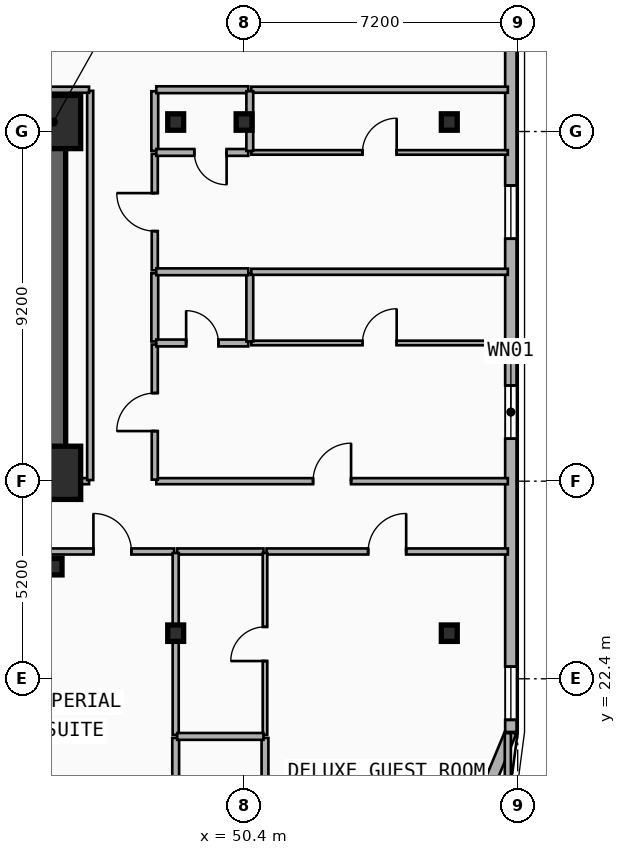
"""IFC4 building model, lengths in metres.
Left out: names, types, materials, properties, quantities, classifications, styles, units other than length and angle.
Written with IfcOpenShell. Run it as: python <this file> out.ifc"""

import sys

from ifc_helpers import new_model, si_unit, direction, frame, frame_2d, origin, origin_2d, place, context, subcontext, project, spatial, rectangle, i_section, extrude, element, fill, save


model = new_model("IFC4")
c1 = context("Model", 3, precision=1e-05, world=origin(), true_north=direction((0.0, 1.0)))
c2 = subcontext(c1, "Body", "Model", "MODEL_VIEW")
j1 = project(units=[si_unit("LENGTHUNIT", "METRE"), si_unit("PLANEANGLEUNIT", "RADIAN")], contexts=[c1])
p1 = place(None, origin())
s1 = spatial("IfcSite", under=j1, at=p1, CompositionType="ELEMENT")
p2 = place(p1, origin())
s2 = spatial("IfcBuilding", under=s1, at=p2, CompositionType="ELEMENT")
p3 = place(p2, frame((0.0, 0.0, 86.3)))
s3 = spatial("IfcBuildingStorey", under=s2, at=p3, CompositionType="ELEMENT", Elevation=86.3)
p4 = place(p3, frame((12.15, 37.05, 0.0), z_axis=(0.0, 0.0, 1.0), x_axis=(1.0, 0.0, 0.0)))
e1 = element("IfcWall", 1, at=p4, inside=s3, PredefinedType="SHEAR", context=c2, shape_type="SweptSolid", body=[
    extrude(rectangle(XDim=33.23, YDim=0.65, at=frame_2d((16.615, 0.0))), origin(), (0.0, 0.0, 1.0), 3.5),
])
p5 = place(p3, frame((45.38, 27.82, 0.0), z_axis=(0.0, 0.0, 1.0), x_axis=(-1.0, 0.0, 0.0)))
e2 = element("IfcWall", 2, at=p5, inside=s3, PredefinedType="SHEAR", context=c2, shape_type="SweptSolid", body=[
    extrude(rectangle(XDim=12.23, YDim=0.65, at=frame_2d((6.115, 0.0))), origin(), (0.0, 0.0, 1.0), 3.5),
])
p6 = place(p5, frame((9.93, 0.0, 0.0)))
e3 = element("IfcOpeningElement", 3, at=p6, cuts=e2, PredefinedType="OPENING", context=c2, shape_type="SweptSolid", body=[
    extrude(rectangle(XDim=1.1, YDim=2.15, at=frame_2d((0.55, 1.075))), frame((0.0, 0.335, 0.0), z_axis=(0.0, -1.0, 0.0), x_axis=(1.0, 0.0, 0.0)), (0.0, 0.0, 1.0), 0.67),
])
p7 = place(p5, frame((6.23, 0.0, 0.0)))
e4 = element("IfcOpeningElement", 4, at=p7, cuts=e2, PredefinedType="OPENING", context=c2, shape_type="SweptSolid", body=[
    extrude(rectangle(XDim=1.1, YDim=2.15, at=frame_2d((0.55, 1.075))), frame((0.0, 0.335, 0.0), z_axis=(0.0, -1.0, 0.0), x_axis=(1.0, 0.0, 0.0)), (0.0, 0.0, 1.0), 0.67),
])
p8 = place(p3, frame((45.38, 28.145, 0.0), z_axis=(0.0, 0.0, 1.0), x_axis=(0.0, 1.0, 0.0)))
e5 = element("IfcWall", 5, at=p8, inside=s3, PredefinedType="SHEAR", context=c2, shape_type="SweptSolid", body=[
    extrude(rectangle(XDim=8.58, YDim=0.65, at=frame_2d((4.29, 0.0))), origin(), (0.0, 0.0, 1.0), 3.5),
])
for number, where, z_axis, x_axis in (
    (6, (45.4, 27.82, 0.0), (0.0, 0.0, 1.0), (1.0, 0.0, 0.0)),
    (7, (45.4, 37.05, 0.0), (0.0, 0.0, 1.0), (1.0, 0.0, 0.0)),
):
    element("IfcColumn", number, at=place(p3, frame(where, z_axis=z_axis, x_axis=x_axis)), inside=s3, PredefinedType="COLUMN", context=c2, shape_type="SweptSolid", body=[
        extrude(rectangle(XDim=1.4, YDim=1.4, at=origin_2d()), origin(), (0.0, 0.0, 1.0), 3.5),
    ])
for number, where, z_axis, x_axis in (
    (8, (45.4, 25.35, 0.0), (0.0, 0.0, 1.0), (1.0, 0.0, 0.0)),
    (9, (48.6, 23.6, 0.0), (0.0, 0.0, 1.0), (1.0, 0.0, 0.0)),
    (10, (48.6, 37.05, 0.0), (0.0, 0.0, 1.0), (1.0, 0.0, 0.0)),
    (11, (50.4, 37.05, 0.0), (0.0, 0.0, 1.0), (1.0, 0.0, 0.0)),
    (12, (55.8, 23.6, 0.0), (0.0, 0.0, 1.0), (1.0, 0.0, 0.0)),
    (13, (55.8, 37.05, 0.0), (0.0, 0.0, 1.0), (1.0, 0.0, 0.0)),
):
    element("IfcColumn", number, at=place(p3, frame(where, z_axis=z_axis, x_axis=x_axis)), inside=s3, PredefinedType="COLUMN", context=c2, shape_type="SweptSolid", body=[
        extrude(i_section(OverallWidth=0.418, OverallDepth=0.432, WebThickness=0.035, FlangeThickness=0.056, FilletRadius=0.015, at=origin_2d()), origin(), (0.0, 0.0, 1.0), 3.5),
    ])
p9 = place(p3, frame((57.42, 21.0, 0.0), z_axis=(0.0, 0.0, 1.0), x_axis=(-0.382636798336, -0.92389884758, 0.0)))
e14 = element("IfcWall", 14, at=p9, inside=s3, PredefinedType="SOLIDWALL", context=c2, shape_type="SweptSolid", body=[
    extrude(rectangle(XDim=3.077, YDim=0.3, at=frame_2d((1.538, 0.0))), origin(), (0.0, 0.0, 1.0), 3.24),
])
p10 = place(p3, frame((57.42, 39.0, 0.0), z_axis=(0.0, 0.0, 1.0), x_axis=(0.0, -1.0, 0.0)))
e15 = element("IfcWall", 15, at=p10, inside=s3, PredefinedType="SOLIDWALL", context=c2, shape_type="SweptSolid", body=[
    extrude(rectangle(XDim=18.0, YDim=0.3, at=frame_2d((9.0, 0.0))), origin(), (0.0, 0.0, 1.0), 3.24),
])
p11 = place(p10, frame((8.882, 0.0, 0.48)))
e16 = element("IfcOpeningElement", 16, at=p11, cuts=e15, PredefinedType="OPENING", context=c2, shape_type="SweptSolid", body=[
    extrude(rectangle(XDim=1.4, YDim=1.8, at=frame_2d((0.7, 0.9))), frame((0.0, 0.16, 0.0), z_axis=(0.0, -1.0, 0.0), x_axis=(1.0, 0.0, 0.0)), (0.0, 0.0, 1.0), 0.32),
])
p12 = place(p10, frame((3.621, 0.0, 0.48)))
e17 = element("IfcOpeningElement", 17, at=p12, cuts=e15, PredefinedType="OPENING", context=c2, shape_type="SweptSolid", body=[
    extrude(rectangle(XDim=1.4, YDim=1.8, at=frame_2d((0.7, 0.9))), frame((0.0, 0.16, 0.0), z_axis=(0.0, -1.0, 0.0), x_axis=(1.0, 0.0, 0.0)), (0.0, 0.0, 1.0), 0.32),
])
p13 = place(p10, frame((16.28, 0.0, 0.65)))
e18 = element("IfcOpeningElement", 18, at=p13, cuts=e15, PredefinedType="OPENING", context=c2, shape_type="SweptSolid", body=[
    extrude(rectangle(XDim=1.4, YDim=1.8, at=frame_2d((0.7, 0.9))), frame((0.0, 0.16, 0.0), z_axis=(0.0, -1.0, 0.0), x_axis=(1.0, 0.0, 0.0)), (0.0, 0.0, 1.0), 0.32),
])
p14 = place(p3, frame((48.09, 27.6, 0.0), z_axis=(0.0, 0.0, 1.0), x_axis=(1.0, 0.0, 0.0)))
e19 = element("IfcWall", 19, at=p14, inside=s3, PredefinedType="PARTITIONING", context=c2, shape_type="SweptSolid", body=[
    extrude(rectangle(XDim=9.25, YDim=0.16, at=frame_2d((4.625, 0.0))), origin(), (0.0, 0.0, 1.0), 2.57),
])
p15 = place(p14, frame((4.125, 0.0, 0.0)))
e20 = element("IfcOpeningElement", 20, at=p15, cuts=e19, PredefinedType="OPENING", context=c2, shape_type="SweptSolid", body=[
    extrude(rectangle(XDim=1.0, YDim=2.15, at=frame_2d((0.5, 1.075))), frame((0.0, 0.09, 0.0), z_axis=(0.0, -1.0, 0.0), x_axis=(1.0, 0.0, 0.0)), (0.0, 0.0, 1.0), 0.18),
])
p16 = place(p3, frame((43.341, 25.75, 0.0), z_axis=(0.0, 0.0, 1.0), x_axis=(1.0, 0.0, 0.0)))
e21 = element("IfcWall", 21, at=p16, inside=s3, PredefinedType="PARTITIONING", context=c2, shape_type="SweptSolid", body=[
    extrude(rectangle(XDim=5.219, YDim=0.16, at=frame_2d((2.609, 0.0))), origin(), (0.0, 0.0, 1.0), 2.31),
])
p17 = place(p16, frame((3.094, 0.0, 0.0)))
e22 = element("IfcOpeningElement", 22, at=p17, cuts=e21, PredefinedType="OPENING", context=c2, shape_type="SweptSolid", body=[
    extrude(rectangle(XDim=1.0, YDim=2.15, at=frame_2d((0.5, 1.075))), frame((0.0, 0.09, 0.0), z_axis=(0.0, -1.0, 0.0), x_axis=(1.0, 0.0, 0.0)), (0.0, 0.0, 1.0), 0.18),
])
p18 = place(p3, frame((50.99, 25.75, 0.0), z_axis=(0.0, 0.0, 1.0), x_axis=(1.0, 0.0, 0.0)))
e23 = element("IfcWall", 23, at=p18, inside=s3, PredefinedType="PARTITIONING", context=c2, shape_type="SweptSolid", body=[
    extrude(rectangle(XDim=6.35, YDim=0.16, at=frame_2d((3.175, 0.0))), origin(), (0.0, 0.0, 1.0), 2.57),
])
p19 = place(p18, frame((2.675, 0.0, 0.0)))
e24 = element("IfcOpeningElement", 24, at=p19, cuts=e23, PredefinedType="OPENING", context=c2, shape_type="SweptSolid", body=[
    extrude(rectangle(XDim=1.0, YDim=2.15, at=frame_2d((0.5, 1.075))), frame((0.0, 0.09, 0.0), z_axis=(0.0, -1.0, 0.0), x_axis=(1.0, 0.0, 0.0)), (0.0, 0.0, 1.0), 0.18),
])
p20 = place(p3, frame((48.64, 25.75, 0.0), z_axis=(0.0, 0.0, 1.0), x_axis=(1.0, 0.0, 0.0)))
e25 = element("IfcWall", 25, at=p20, inside=s3, PredefinedType="PARTITIONING", context=c2, shape_type="SweptSolid", body=[
    extrude(rectangle(XDim=2.27, YDim=0.16, at=frame_2d((1.135, 0.0))), origin(), (0.0, 0.0, 1.0), 2.57),
])
p21 = place(p3, frame((48.05, 27.64, 0.0), z_axis=(0.0, 0.0, 1.0), x_axis=(0.0, 1.0, 0.0)))
e26 = element("IfcWall", 26, at=p21, inside=s3, PredefinedType="PARTITIONING", context=c2, shape_type="SweptSolid", body=[
    extrude(rectangle(XDim=3.556, YDim=0.16, at=frame_2d((1.778, 0.0))), origin(), (0.0, 0.0, 1.0), 3.24),
])
p22 = place(p21, frame((1.278, 0.0, 0.0)))
e27 = element("IfcOpeningElement", 27, at=p22, cuts=e26, PredefinedType="OPENING", context=c2, shape_type="SweptSolid", body=[
    extrude(rectangle(XDim=1.0, YDim=2.15, at=frame_2d((0.5, 1.075))), frame((0.0, 0.09, 0.0), z_axis=(0.0, -1.0, 0.0), x_axis=(1.0, 0.0, 0.0)), (0.0, 0.0, 1.0), 0.18),
])
p23 = place(p3, frame((48.05, 31.276, 0.0), z_axis=(0.0, 0.0, 1.0), x_axis=(0.0, 1.0, 0.0)))
e28 = element("IfcWall", 28, at=p23, inside=s3, PredefinedType="PLUMBINGWALL", context=c2, shape_type="SweptSolid", body=[
    extrude(rectangle(XDim=1.793, YDim=0.18, at=frame_2d((0.896, 0.0))), origin(), (0.0, 0.0, 1.0), 3.24),
])
p24 = place(p3, frame((48.05, 33.149, 0.0), z_axis=(0.0, 0.0, 1.0), x_axis=(0.0, 1.0, 0.0)))
e29 = element("IfcWall", 29, at=p24, inside=s3, PredefinedType="PARTITIONING", context=c2, shape_type="SweptSolid", body=[
    extrude(rectangle(XDim=3.061, YDim=0.16, at=frame_2d((1.531, 0.0))), origin(), (0.0, 0.0, 1.0), 3.24),
])
p25 = place(p24, frame((1.031, 0.0, 0.0)))
e30 = element("IfcOpeningElement", 30, at=p25, cuts=e29, PredefinedType="OPENING", context=c2, shape_type="SweptSolid", body=[
    extrude(rectangle(XDim=1.0, YDim=2.15, at=frame_2d((0.5, 1.075))), frame((0.0, 0.09, 0.0), z_axis=(0.0, -1.0, 0.0), x_axis=(1.0, 0.0, 0.0)), (0.0, 0.0, 1.0), 0.18),
])
p26 = place(p3, frame((48.05, 36.29, 0.0), z_axis=(0.0, 0.0, 1.0), x_axis=(0.0, 1.0, 0.0)))
e31 = element("IfcWall", 31, at=p26, inside=s3, PredefinedType="PLUMBINGWALL", context=c2, shape_type="SweptSolid", body=[
    extrude(rectangle(XDim=1.57, YDim=0.18, at=frame_2d((0.785, 0.0))), origin(), (0.0, 0.0, 1.0), 2.72),
])
p27 = place(p3, frame((48.09, 37.9, 0.0), z_axis=(0.0, 0.0, 1.0), x_axis=(1.0, 0.0, 0.0)))
e32 = element("IfcWall", 32, at=p27, inside=s3, PredefinedType="PLUMBINGWALL", context=c2, shape_type="SweptSolid", body=[
    extrude(rectangle(XDim=2.42, YDim=0.18, at=frame_2d((1.21, 0.0))), origin(), (0.0, 0.0, 1.0), 3.24),
])
p28 = place(p3, frame((50.59, 37.9, 0.0), z_axis=(0.0, 0.0, 1.0), x_axis=(1.0, 0.0, 0.0)))
e33 = element("IfcWall", 33, at=p28, inside=s3, PredefinedType="PARTITIONING", context=c2, shape_type="SweptSolid", body=[
    extrude(rectangle(XDim=6.75, YDim=0.16, at=frame_2d((3.375, 0.0))), origin(), (0.0, 0.0, 1.0), 3.24),
])
p29 = place(p3, frame((48.09, 31.236, 0.0), z_axis=(0.0, 0.0, 1.0), x_axis=(1.0, 0.0, 0.0)))
e34 = element("IfcWall", 34, at=p29, inside=s3, PredefinedType="PLUMBINGWALL", context=c2, shape_type="SweptSolid", body=[
    extrude(rectangle(XDim=2.42, YDim=0.18, at=frame_2d((1.21, 0.0))), origin(), (0.0, 0.0, 1.0), 2.57),
])
p30 = place(p29, frame((0.785, 0.0, 0.0)))
e35 = element("IfcOpeningElement", 35, at=p30, cuts=e34, PredefinedType="OPENING", context=c2, shape_type="SweptSolid", body=[
    extrude(rectangle(XDim=0.85, YDim=2.1, at=frame_2d((0.425, 1.05))), frame((0.0, 0.1, 0.0), z_axis=(0.0, -1.0, 0.0), x_axis=(1.0, 0.0, 0.0)), (0.0, 0.0, 1.0), 0.2),
])
p31 = place(p3, frame((50.59, 31.236, 0.0), z_axis=(0.0, 0.0, 1.0), x_axis=(1.0, 0.0, 0.0)))
e36 = element("IfcWall", 36, at=p31, inside=s3, PredefinedType="PARTITIONING", context=c2, shape_type="SweptSolid", body=[
    extrude(rectangle(XDim=6.75, YDim=0.12, at=frame_2d((3.375, 0.0))), origin(), (0.0, 0.0, 1.0), 2.57),
])
p32 = place(p31, frame((2.925, 0.0, 0.0)))
e37 = element("IfcOpeningElement", 37, at=p32, cuts=e36, PredefinedType="OPENING", context=c2, shape_type="SweptSolid", body=[
    extrude(rectangle(XDim=0.9, YDim=2.1, at=frame_2d((0.45, 1.05))), frame((0.0, 0.07, 0.0), z_axis=(0.0, -1.0, 0.0), x_axis=(1.0, 0.0, 0.0)), (0.0, 0.0, 1.0), 0.14),
])
p33 = place(p3, frame((50.55, 31.276, 0.0), z_axis=(0.0, 0.0, 1.0), x_axis=(0.0, 1.0, 0.0)))
e38 = element("IfcWall", 38, at=p33, inside=s3, PredefinedType="PLUMBINGWALL", context=c2, shape_type="SweptSolid", body=[
    extrude(rectangle(XDim=1.793, YDim=0.18, at=frame_2d((0.896, 0.0))), origin(), (0.0, 0.0, 1.0), 2.57),
])
p34 = place(p3, frame((48.09, 33.109, 0.0), z_axis=(0.0, 0.0, 1.0), x_axis=(1.0, 0.0, 0.0)))
e39 = element("IfcWall", 39, at=p34, inside=s3, PredefinedType="PLUMBINGWALL", context=c2, shape_type="SweptSolid", body=[
    extrude(rectangle(XDim=2.42, YDim=0.18, at=frame_2d((1.21, 0.0))), origin(), (0.0, 0.0, 1.0), 2.57),
])
p35 = place(p3, frame((50.59, 33.109, 0.0), z_axis=(0.0, 0.0, 1.0), x_axis=(1.0, 0.0, 0.0)))
e40 = element("IfcWall", 40, at=p35, inside=s3, PredefinedType="PARTITIONING", context=c2, shape_type="SweptSolid", body=[
    extrude(rectangle(XDim=6.75, YDim=0.16, at=frame_2d((3.375, 0.0))), origin(), (0.0, 0.0, 1.0), 2.57),
])
p36 = place(p3, frame((50.51, 36.25, 0.0), z_axis=(0.0, 0.0, 1.0), x_axis=(-1.0, 0.0, 0.0)))
e41 = element("IfcWall", 41, at=p36, inside=s3, PredefinedType="PLUMBINGWALL", context=c2, shape_type="SweptSolid", body=[
    extrude(rectangle(XDim=2.42, YDim=0.18, at=frame_2d((1.21, 0.0))), origin(), (0.0, 0.0, 1.0), 2.57),
])
p37 = place(p36, frame((0.57, 0.0, 0.0)))
e42 = element("IfcOpeningElement", 42, at=p37, cuts=e41, PredefinedType="OPENING", context=c2, shape_type="SweptSolid", body=[
    extrude(rectangle(XDim=0.85, YDim=2.1, at=frame_2d((0.425, 1.05))), frame((0.0, 0.1, 0.0), z_axis=(0.0, -1.0, 0.0), x_axis=(1.0, 0.0, 0.0)), (0.0, 0.0, 1.0), 0.2),
])
p38 = place(p3, frame((50.59, 36.25, 0.0), z_axis=(0.0, 0.0, 1.0), x_axis=(1.0, 0.0, 0.0)))
e43 = element("IfcWall", 43, at=p38, inside=s3, PredefinedType="PARTITIONING", context=c2, shape_type="SweptSolid", body=[
    extrude(rectangle(XDim=6.75, YDim=0.12, at=frame_2d((3.375, 0.0))), origin(), (0.0, 0.0, 1.0), 2.57),
])
p39 = place(p38, frame((2.925, 0.0, 0.0)))
e44 = element("IfcOpeningElement", 44, at=p39, cuts=e43, PredefinedType="OPENING", context=c2, shape_type="SweptSolid", body=[
    extrude(rectangle(XDim=0.9, YDim=2.1, at=frame_2d((0.45, 1.05))), frame((0.0, 0.07, 0.0), z_axis=(0.0, -1.0, 0.0), x_axis=(1.0, 0.0, 0.0)), (0.0, 0.0, 1.0), 0.14),
])
p40 = place(p3, frame((50.55, 36.29, 0.0), z_axis=(0.0, 0.0, 1.0), x_axis=(0.0, 1.0, 0.0)))
e45 = element("IfcWall", 45, at=p40, inside=s3, PredefinedType="PLUMBINGWALL", context=c2, shape_type="SweptSolid", body=[
    extrude(rectangle(XDim=1.57, YDim=0.18, at=frame_2d((0.785, 0.0))), origin(), (0.0, 0.0, 1.0), 2.57),
])
p41 = place(p3, frame((48.6, 17.06, 0.0), z_axis=(0.0, 0.0, 1.0), x_axis=(0.0, 1.0, 0.0)))
e46 = element("IfcWall", 46, at=p41, inside=s3, PredefinedType="PLUMBINGWALL", context=c2, shape_type="SweptSolid", body=[
    extrude(rectangle(XDim=3.784, YDim=0.18, at=frame_2d((1.892, 0.0))), origin(), (0.0, 0.0, 1.0), 2.72),
])
p42 = place(p3, frame((48.6, 20.924, 0.0), z_axis=(0.0, 0.0, 1.0), x_axis=(0.0, 1.0, 0.0)))
e47 = element("IfcWall", 47, at=p42, inside=s3, PredefinedType="PARTITIONING", context=c2, shape_type="SweptSolid", body=[
    extrude(rectangle(XDim=4.786, YDim=0.16, at=frame_2d((2.393, 0.0))), origin(), (0.0, 0.0, 1.0), 2.72),
])
p43 = place(p3, frame((50.95, 17.06, 0.0), z_axis=(0.0, 0.0, 1.0), x_axis=(0.0, 1.0, 0.0)))
e48 = element("IfcWall", 48, at=p43, inside=s3, PredefinedType="PLUMBINGWALL", context=c2, shape_type="SweptSolid", body=[
    extrude(rectangle(XDim=3.784, YDim=0.18, at=frame_2d((1.892, 0.0))), origin(), (0.0, 0.0, 1.0), 2.57),
])
p44 = place(p43, frame((0.25, 0.0, 0.0)))
e49 = element("IfcOpeningElement", 49, at=p44, cuts=e48, PredefinedType="OPENING", context=c2, shape_type="SweptSolid", body=[
    extrude(rectangle(XDim=0.85, YDim=2.1, at=frame_2d((0.425, 1.05))), frame((0.0, 0.1, 0.0), z_axis=(0.0, -1.0, 0.0), x_axis=(1.0, 0.0, 0.0)), (0.0, 0.0, 1.0), 0.2),
])
p45 = place(p3, frame((50.95, 20.924, 0.0), z_axis=(0.0, 0.0, 1.0), x_axis=(0.0, 1.0, 0.0)))
e50 = element("IfcWall", 50, at=p45, inside=s3, PredefinedType="PARTITIONING", context=c2, shape_type="SweptSolid", body=[
    extrude(rectangle(XDim=4.786, YDim=0.12, at=frame_2d((2.393, 0.0))), origin(), (0.0, 0.0, 1.0), 2.57),
])
p46 = place(p45, frame((1.943, 0.0, 0.0)))
e51 = element("IfcOpeningElement", 51, at=p46, cuts=e50, PredefinedType="OPENING", context=c2, shape_type="SweptSolid", body=[
    extrude(rectangle(XDim=0.9, YDim=2.1, at=frame_2d((0.45, 1.05))), frame((0.0, 0.07, 0.0), z_axis=(0.0, -1.0, 0.0), x_axis=(1.0, 0.0, 0.0)), (0.0, 0.0, 1.0), 0.14),
])
p47 = place(p3, frame((48.64, 20.884, 0.0), z_axis=(0.0, 0.0, 1.0), x_axis=(1.0, 0.0, 0.0)))
e52 = element("IfcWall", 52, at=p47, inside=s3, PredefinedType="PLUMBINGWALL", context=c2, shape_type="SweptSolid", body=[
    extrude(rectangle(XDim=2.27, YDim=0.18, at=frame_2d((1.135, 0.0))), origin(), (0.0, 0.0, 1.0), 2.57),
])
p48 = place(p3, frame((45.41, 27.6, 0.0), z_axis=(0.0, 0.0, 1.0), x_axis=(1.0, 0.0, 0.0)))
e53 = element("IfcWall", 53, at=p48, inside=s3, PredefinedType="PARTITIONING", context=c2, shape_type="SweptSolid", body=[
    extrude(rectangle(XDim=0.91, YDim=0.16, at=frame_2d((0.455, 0.0))), origin(), (0.0, 0.0, 1.0), 2.28),
])
p49 = place(p3, frame((46.35, 27.63, 0.0), z_axis=(0.0, 0.0, 1.0), x_axis=(0.0, 1.0, 0.0)))
e54 = element("IfcWall", 54, at=p49, inside=s3, PredefinedType="PARTITIONING", context=c2, shape_type="SweptSolid", body=[
    extrude(rectangle(XDim=10.24, YDim=0.16, at=frame_2d((5.12, 0.0))), origin(), (0.0, 0.0, 1.0), 2.72),
])
p50 = place(p3, frame((11.28, 37.9, 0.0), z_axis=(0.0, 0.0, 1.0), x_axis=(1.0, 0.0, 0.0)))
e55 = element("IfcWall", 55, at=p50, inside=s3, PredefinedType="PARTITIONING", context=c2, shape_type="SweptSolid", body=[
    extrude(rectangle(XDim=35.04, YDim=0.16, at=frame_2d((17.52, 0.0))), origin(), (0.0, 0.0, 1.0), 3.24),
])
p51 = place(p3, frame((57.34, 17.09, 0.0), z_axis=(0.0, 0.0, 1.0), x_axis=(0.0, 1.0, 0.0)))
e56 = element("IfcWall", 56, at=p51, inside=s3, PredefinedType="PARTITIONING", context=c2, shape_type="SweptSolid", body=[
    extrude(rectangle(XDim=3.88, YDim=0.16, at=frame_2d((1.94, 0.0))), origin(), (0.0, 0.0, 1.0), 3.24),
])
p52 = place(p11, origin())
e57 = element("IfcWindow", 57, at=p52, inside=s3, PartitioningType="SINGLE_PANEL", PredefinedType="WINDOW", context=c2, shape_type="SweptSolid", body=[
    extrude(rectangle(XDim=1.4, YDim=1.8, at=frame_2d((0.7, 0.9))), frame((0.0, 0.03, 0.0), z_axis=(0.0, -1.0, 0.0), x_axis=(1.0, 0.0, 0.0)), (0.0, 0.0, 1.0), 0.06),
])
fill(e16, e57)
p53 = place(p12, origin())
e58 = element("IfcWindow", 58, at=p53, inside=s3, PartitioningType="SINGLE_PANEL", PredefinedType="WINDOW", context=c2, shape_type="SweptSolid", body=[
    extrude(rectangle(XDim=1.4, YDim=1.8, at=frame_2d((0.7, 0.9))), frame((0.0, 0.03, 0.0), z_axis=(0.0, -1.0, 0.0), x_axis=(1.0, 0.0, 0.0)), (0.0, 0.0, 1.0), 0.06),
])
fill(e17, e58)
p54 = place(p13, origin())
e59 = element("IfcWindow", 59, at=p54, inside=s3, PartitioningType="SINGLE_PANEL", PredefinedType="WINDOW", context=c2, shape_type="SweptSolid", body=[
    extrude(rectangle(XDim=1.4, YDim=1.8, at=frame_2d((0.7, 0.9))), frame((0.0, 0.03, 0.0), z_axis=(0.0, -1.0, 0.0), x_axis=(1.0, 0.0, 0.0)), (0.0, 0.0, 1.0), 0.06),
])
fill(e18, e59)
p55 = place(p15, origin())
e60 = element("IfcDoor", 60, at=p55, inside=s3, OperationType="SINGLE_SWING_RIGHT", PredefinedType="DOOR", context=c2, shape_type="SweptSolid", body=[
    extrude(rectangle(XDim=1.0, YDim=2.15, at=frame_2d((0.5, 1.075))), frame((0.0, 0.025, 0.0), z_axis=(0.0, -1.0, 0.0), x_axis=(1.0, 0.0, 0.0)), (0.0, 0.0, 1.0), 0.05),
])
fill(e20, e60)
p56 = place(p17, origin())
e61 = element("IfcDoor", 61, at=p56, inside=s3, OperationType="SINGLE_SWING_LEFT", PredefinedType="DOOR", context=c2, shape_type="SweptSolid", body=[
    extrude(rectangle(XDim=1.0, YDim=2.15, at=frame_2d((0.5, 1.075))), frame((0.0, 0.025, 0.0), z_axis=(0.0, -1.0, 0.0), x_axis=(1.0, 0.0, 0.0)), (0.0, 0.0, 1.0), 0.05),
])
fill(e22, e61)
p57 = place(p19, origin())
e62 = element("IfcDoor", 62, at=p57, inside=s3, OperationType="SINGLE_SWING_RIGHT", PredefinedType="DOOR", context=c2, shape_type="SweptSolid", body=[
    extrude(rectangle(XDim=1.0, YDim=2.15, at=frame_2d((0.5, 1.075))), frame((0.0, 0.025, 0.0), z_axis=(0.0, -1.0, 0.0), x_axis=(1.0, 0.0, 0.0)), (0.0, 0.0, 1.0), 0.05),
])
fill(e24, e62)
p58 = place(p22, origin())
e63 = element("IfcDoor", 63, at=p58, inside=s3, OperationType="SINGLE_SWING_LEFT", PredefinedType="DOOR", context=c2, shape_type="SweptSolid", body=[
    extrude(rectangle(XDim=1.0, YDim=2.15, at=frame_2d((0.5, 1.075))), frame((0.0, 0.025, 0.0), z_axis=(0.0, -1.0, 0.0), x_axis=(1.0, 0.0, 0.0)), (0.0, 0.0, 1.0), 0.05),
])
fill(e27, e63)
p59 = place(p25, origin())
e64 = element("IfcDoor", 64, at=p59, inside=s3, OperationType="SINGLE_SWING_RIGHT", PredefinedType="DOOR", context=c2, shape_type="SweptSolid", body=[
    extrude(rectangle(XDim=1.0, YDim=2.15, at=frame_2d((0.5, 1.075))), frame((0.0, 0.025, 0.0), z_axis=(0.0, -1.0, 0.0), x_axis=(1.0, 0.0, 0.0)), (0.0, 0.0, 1.0), 0.05),
])
fill(e30, e64)
p60 = place(p30, origin())
e65 = element("IfcDoor", 65, at=p60, inside=s3, OperationType="SINGLE_SWING_LEFT", PredefinedType="DOOR", context=c2, shape_type="SweptSolid", body=[
    extrude(rectangle(XDim=0.85, YDim=2.1, at=frame_2d((0.425, 1.05))), frame((0.0, 0.025, 0.0), z_axis=(0.0, -1.0, 0.0), x_axis=(1.0, 0.0, 0.0)), (0.0, 0.0, 1.0), 0.05),
])
fill(e35, e65)
p61 = place(p32, origin())
e66 = element("IfcDoor", 66, at=p61, inside=s3, OperationType="SINGLE_SWING_RIGHT", PredefinedType="DOOR", context=c2, shape_type="SweptSolid", body=[
    extrude(rectangle(XDim=0.9, YDim=2.1, at=frame_2d((0.45, 1.05))), frame((0.0, 0.025, 0.0), z_axis=(0.0, -1.0, 0.0), x_axis=(1.0, 0.0, 0.0)), (0.0, 0.0, 1.0), 0.05),
])
fill(e37, e66)
p62 = place(p37, origin())
e67 = element("IfcDoor", 67, at=p62, inside=s3, OperationType="SINGLE_SWING_LEFT", PredefinedType="DOOR", context=c2, shape_type="SweptSolid", body=[
    extrude(rectangle(XDim=0.85, YDim=2.1, at=frame_2d((0.425, 1.05))), frame((0.0, 0.025, 0.0), z_axis=(0.0, -1.0, 0.0), x_axis=(1.0, 0.0, 0.0)), (0.0, 0.0, 1.0), 0.05),
])
fill(e42, e67)
p63 = place(p39, origin())
e68 = element("IfcDoor", 68, at=p63, inside=s3, OperationType="SINGLE_SWING_RIGHT", PredefinedType="DOOR", context=c2, shape_type="SweptSolid", body=[
    extrude(rectangle(XDim=0.9, YDim=2.1, at=frame_2d((0.45, 1.05))), frame((0.0, 0.025, 0.0), z_axis=(0.0, -1.0, 0.0), x_axis=(1.0, 0.0, 0.0)), (0.0, 0.0, 1.0), 0.05),
])
fill(e44, e68)
p64 = place(p46, origin())
e69 = element("IfcDoor", 69, at=p64, inside=s3, OperationType="SINGLE_SWING_LEFT", PredefinedType="DOOR", context=c2, shape_type="SweptSolid", body=[
    extrude(rectangle(XDim=0.9, YDim=2.1, at=frame_2d((0.45, 1.05))), frame((0.0, 0.025, 0.0), z_axis=(0.0, -1.0, 0.0), x_axis=(1.0, 0.0, 0.0)), (0.0, 0.0, 1.0), 0.05),
])
fill(e51, e69)
save(model, sys.argv[1])
